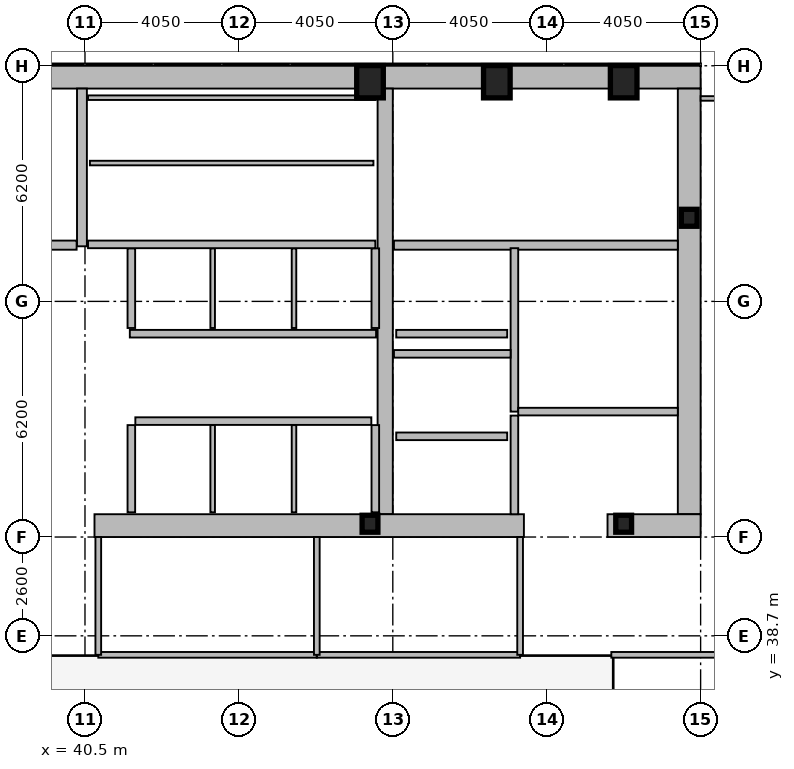
"""IFC4 building model, lengths in metres.
Left out: names, types, materials, properties, quantities, classifications, styles, units other than length and angle.
Written with IfcOpenShell. Run it as: python <this file> out.ifc"""

import sys

from ifc_helpers import new_model, si_unit, direction, frame, frame_2d, origin, origin_2d, place, context, subcontext, project, spatial, rectangle, hollow_rectangle, i_section, extrude, element, fill, save


model = new_model("IFC4")
c1 = context("Model", 3, precision=1e-05, world=origin(), true_north=direction((0.0, 1.0)))
c2 = subcontext(c1, "Body", "Model", "MODEL_VIEW")
j1 = project(units=[si_unit("LENGTHUNIT", "METRE"), si_unit("PLANEANGLEUNIT", "RADIAN")], contexts=[c1])
p1 = place(None, origin())
s1 = spatial("IfcSite", under=j1, at=p1, CompositionType="ELEMENT")
p2 = place(p1, origin())
s2 = spatial("IfcBuilding", under=s1, at=p2, CompositionType="ELEMENT")
p3 = place(p2, frame((0.0, 0.0, 184.2)))
s3 = spatial("IfcBuildingStorey", under=s2, at=p3, CompositionType="ELEMENT", Elevation=184.2)
p4 = place(p3, frame((16.2, 53.4, 0.0), z_axis=(0.0, 0.0, 1.0), x_axis=(1.0, 0.0, 0.0)))
e1 = element("IfcWall", 1, at=p4, inside=s3, PredefinedType="SHEAR", context=c2, shape_type="SweptSolid", body=[
    extrude(rectangle(XDim=40.5, YDim=0.6, at=frame_2d((20.25, 0.0))), origin(), (0.0, 0.0, 1.0), 4.24),
])
p5 = place(p3, frame((56.4, 53.1, 0.0), z_axis=(0.0, 0.0, 1.0), x_axis=(0.0, -1.0, 0.0)))
e2 = element("IfcWall", 2, at=p5, inside=s3, PredefinedType="SHEAR", context=c2, shape_type="SweptSolid", body=[
    extrude(rectangle(XDim=11.2, YDim=0.6, at=frame_2d((5.6, 0.0))), origin(), (0.0, 0.0, 1.0), 4.24),
])
p6 = place(p3, frame((48.4, 41.9, 0.0), z_axis=(0.0, 0.0, 1.0), x_axis=(0.0, 1.0, 0.0)))
e3 = element("IfcWall", 3, at=p6, inside=s3, PredefinedType="SHEAR", context=c2, shape_type="SweptSolid", body=[
    extrude(rectangle(XDim=11.2, YDim=0.4, at=frame_2d((5.6, 0.0))), origin(), (0.0, 0.0, 1.0), 4.24),
])
p7 = place(p3, frame((52.05, 41.6, 0.0), z_axis=(0.0, 0.0, 1.0), x_axis=(-1.0, 0.0, 0.0)))
e4 = element("IfcWall", 4, at=p7, inside=s3, PredefinedType="SHEAR", context=c2, shape_type="SweptSolid", body=[
    extrude(rectangle(XDim=11.3, YDim=0.6, at=frame_2d((5.65, 0.0))), origin(), (0.0, 0.0, 1.0), 4.24),
])
p8 = place(p3, frame((56.7, 41.6, 0.0), z_axis=(0.0, 0.0, 1.0), x_axis=(-1.0, 0.0, 0.0)))
e5 = element("IfcWall", 5, at=p8, inside=s3, PredefinedType="SHEAR", context=c2, shape_type="SweptSolid", body=[
    extrude(rectangle(XDim=2.45, YDim=0.6, at=frame_2d((1.225, 0.0))), origin(), (0.0, 0.0, 1.0), 4.24),
])
p9 = place(p3, frame((40.42, 48.95, 0.0), z_axis=(0.0, 0.0, 1.0), x_axis=(0.0, 1.0, 0.0)))
e6 = element("IfcWall", 6, at=p9, inside=s3, PredefinedType="SHEAR", context=c2, shape_type="SweptSolid", body=[
    extrude(rectangle(XDim=4.15, YDim=0.26, at=frame_2d((2.075, 0.0))), origin(), (0.0, 0.0, 1.0), 4.24),
])
p10 = place(p3, frame((48.63, 48.98, 0.0), z_axis=(0.0, 0.0, 1.0), x_axis=(1.0, 0.0, 0.0)))
e7 = element("IfcWall", 7, at=p10, inside=s3, PredefinedType="SHEAR", context=c2, shape_type="SweptSolid", body=[
    extrude(rectangle(XDim=7.47, YDim=0.24, at=frame_2d((3.735, 0.0))), origin(), (0.0, 0.0, 1.0), 4.24),
])
p11 = place(p10, frame((6.2, 0.0, 0.0)))
e8 = element("IfcOpeningElement", 8, at=p11, cuts=e7, PredefinedType="OPENING", context=c2, shape_type="SweptSolid", body=[
    extrude(rectangle(XDim=1.05, YDim=2.15, at=frame_2d((0.525, 1.075))), frame((0.0, 0.13, 0.0), z_axis=(0.0, -1.0, 0.0), x_axis=(1.0, 0.0, 0.0)), (0.0, 0.0, 1.0), 0.26),
])
p12 = place(p3, frame((32.72, 48.98, 0.0), z_axis=(0.0, 0.0, 1.0), x_axis=(1.0, 0.0, 0.0)))
e9 = element("IfcWall", 9, at=p12, inside=s3, PredefinedType="SHEAR", context=c2, shape_type="SweptSolid", body=[
    extrude(rectangle(XDim=7.56, YDim=0.24, at=frame_2d((3.78, 0.0))), origin(), (0.0, 0.0, 1.0), 4.24),
])
p13 = place(p12, frame((0.22, 0.0, 0.0)))
e10 = element("IfcOpeningElement", 10, at=p13, cuts=e9, PredefinedType="OPENING", context=c2, shape_type="SweptSolid", body=[
    extrude(rectangle(XDim=1.05, YDim=2.15, at=frame_2d((0.525, 1.075))), frame((0.0, 0.13, 0.0), z_axis=(0.0, -1.0, 0.0), x_axis=(1.0, 0.0, 0.0)), (0.0, 0.0, 1.0), 0.26),
])
for number, where, z_axis, x_axis in (
    (11, (48.0, 53.28, 0.0), (0.0, 0.0, 1.0), (1.0, 0.0, 0.0)),
    (12, (51.337, 53.28, 0.0), (0.0, 0.0, 1.0), (1.0, 0.0, 0.0)),
    (13, (54.675, 53.28, 0.0), (0.0, 0.0, 1.0), (1.0, 0.0, 0.0)),
):
    element("IfcColumn", number, at=place(p3, frame(where, z_axis=z_axis, x_axis=x_axis)), inside=s3, PredefinedType="COLUMN", context=c2, shape_type="SweptSolid", body=[
        extrude(hollow_rectangle(XDim=0.7, YDim=0.85, WallThickness=0.05, at=origin_2d()), origin(), (0.0, 0.0, 1.0), 4.4),
    ])
for number, where, z_axis, x_axis in (
    (14, (56.4, 49.7, 0.0), (0.0, 0.0, 1.0), (1.0, 0.0, 0.0)),
    (15, (48.0, 41.65, 0.0), (0.0, 0.0, 1.0), (1.0, 0.0, 0.0)),
    (16, (54.675, 41.65, 0.0), (0.0, 0.0, 1.0), (1.0, 0.0, 0.0)),
):
    element("IfcColumn", number, at=place(p3, frame(where, z_axis=z_axis, x_axis=x_axis)), inside=s3, PredefinedType="COLUMN", context=c2, shape_type="SweptSolid", body=[
        extrude(i_section(OverallWidth=0.416, OverallDepth=0.446, WebThickness=0.039, FlangeThickness=0.063, at=origin_2d()), origin(), (0.0, 0.0, 1.0), 4.4),
    ])
p14 = place(p3, frame((51.61, 43.95, 0.0), z_axis=(0.0, 0.0, 1.0), x_axis=(-1.0, 0.0, 0.0)))
e17 = element("IfcWall", 17, at=p14, inside=s3, PredefinedType="PARTITIONING", context=c2, shape_type="SweptSolid", body=[
    extrude(rectangle(XDim=2.92, YDim=0.2, at=frame_2d((1.46, 0.0))), origin(), (0.0, 0.0, 1.0), 4.24),
])
p15 = place(p14, frame((0.81, 0.0, 0.0)))
e18 = element("IfcOpeningElement", 18, at=p15, cuts=e17, PredefinedType="OPENING", context=c2, shape_type="SweptSolid", body=[
    extrude(rectangle(XDim=1.3, YDim=2.18, at=frame_2d((0.65, 1.09))), frame((0.0, 0.11, 0.0), z_axis=(0.0, -1.0, 0.0), x_axis=(1.0, 0.0, 0.0)), (0.0, 0.0, 1.0), 0.22),
])
p16 = place(p3, frame((51.61, 46.65, 0.0), z_axis=(0.0, 0.0, 1.0), x_axis=(-1.0, 0.0, 0.0)))
e19 = element("IfcWall", 19, at=p16, inside=s3, PredefinedType="PARTITIONING", context=c2, shape_type="SweptSolid", body=[
    extrude(rectangle(XDim=2.92, YDim=0.2, at=frame_2d((1.46, 0.0))), origin(), (0.0, 0.0, 1.0), 4.24),
])
p17 = place(p16, frame((0.86, 0.0, 0.0)))
e20 = element("IfcOpeningElement", 20, at=p17, cuts=e19, PredefinedType="OPENING", context=c2, shape_type="SweptSolid", body=[
    extrude(rectangle(XDim=1.2, YDim=2.18, at=frame_2d((0.6, 1.09))), frame((0.0, 0.11, 0.0), z_axis=(0.0, -1.0, 0.0), x_axis=(1.0, 0.0, 0.0)), (0.0, 0.0, 1.0), 0.22),
])
p18 = place(p3, frame((48.16, 46.65, 0.0), z_axis=(0.0, 0.0, 1.0), x_axis=(-1.0, 0.0, 0.0)))
e21 = element("IfcWall", 21, at=p18, inside=s3, PredefinedType="PARTITIONING", context=c2, shape_type="SweptSolid", body=[
    extrude(rectangle(XDim=6.48, YDim=0.2, at=frame_2d((3.24, 0.0))), origin(), (0.0, 0.0, 1.0), 4.24),
])
p19 = place(p18, frame((4.8, 0.0, 0.0)))
e22 = element("IfcOpeningElement", 22, at=p19, cuts=e21, PredefinedType="OPENING", context=c2, shape_type="SweptSolid", body=[
    extrude(rectangle(XDim=1.1, YDim=2.18, at=frame_2d((0.55, 1.09))), frame((0.0, 0.11, 0.0), z_axis=(0.0, -1.0, 0.0), x_axis=(1.0, 0.0, 0.0)), (0.0, 0.0, 1.0), 0.22),
])
p20 = place(p18, frame((2.64, 0.0, 0.0)))
e23 = element("IfcOpeningElement", 23, at=p20, cuts=e21, PredefinedType="OPENING", context=c2, shape_type="SweptSolid", body=[
    extrude(rectangle(XDim=1.1, YDim=2.18, at=frame_2d((0.55, 1.09))), frame((0.0, 0.11, 0.0), z_axis=(0.0, -1.0, 0.0), x_axis=(1.0, 0.0, 0.0)), (0.0, 0.0, 1.0), 0.22),
])
p21 = place(p18, frame((0.48, 0.0, 0.0)))
e24 = element("IfcOpeningElement", 24, at=p21, cuts=e21, PredefinedType="OPENING", context=c2, shape_type="SweptSolid", body=[
    extrude(rectangle(XDim=1.1, YDim=2.18, at=frame_2d((0.55, 1.09))), frame((0.0, 0.11, 0.0), z_axis=(0.0, -1.0, 0.0), x_axis=(1.0, 0.0, 0.0)), (0.0, 0.0, 1.0), 0.22),
])
p22 = place(p3, frame((51.8, 44.6, 0.0), z_axis=(0.0, 0.0, 1.0), x_axis=(0.0, 1.0, 0.0)))
e25 = element("IfcWall", 25, at=p22, inside=s3, PredefinedType="PARTITIONING", context=c2, shape_type="SweptSolid", body=[
    extrude(rectangle(XDim=4.3, YDim=0.2, at=frame_2d((2.15, 0.0))), origin(), (0.0, 0.0, 1.0), 4.24),
])
p23 = place(p3, frame((51.9, 44.6, 0.0), z_axis=(0.0, 0.0, 1.0), x_axis=(1.0, 0.0, 0.0)))
e26 = element("IfcWall", 26, at=p23, inside=s3, PredefinedType="PARTITIONING", context=c2, shape_type="SweptSolid", body=[
    extrude(rectangle(XDim=4.2, YDim=0.2, at=frame_2d((2.1, 0.0))), origin(), (0.0, 0.0, 1.0), 4.24),
])
p24 = place(p23, frame((1.15, 0.0, 0.0)))
e27 = element("IfcOpeningElement", 27, at=p24, cuts=e26, PredefinedType="OPENING", context=c2, shape_type="SweptSolid", body=[
    extrude(rectangle(XDim=1.05, YDim=2.15, at=frame_2d((0.525, 1.075))), frame((0.0, 0.11, 0.0), z_axis=(0.0, -1.0, 0.0), x_axis=(1.0, 0.0, 0.0)), (0.0, 0.0, 1.0), 0.22),
])
p25 = place(p3, frame((48.63, 46.12, 0.0), z_axis=(0.0, 0.0, 1.0), x_axis=(1.0, 0.0, 0.0)))
e28 = element("IfcWall", 28, at=p25, inside=s3, PredefinedType="PARTITIONING", context=c2, shape_type="SweptSolid", body=[
    extrude(rectangle(XDim=3.07, YDim=0.2, at=frame_2d((1.535, 0.0))), origin(), (0.0, 0.0, 1.0), 4.24),
])
p26 = place(p3, frame((51.8, 41.9, 0.0), z_axis=(0.0, 0.0, 1.0), x_axis=(0.0, 1.0, 0.0)))
e29 = element("IfcWall", 29, at=p26, inside=s3, PredefinedType="PARTITIONING", context=c2, shape_type="SweptSolid", body=[
    extrude(rectangle(XDim=2.595, YDim=0.2, at=frame_2d((1.298, 0.0))), origin(), (0.0, 0.0, 1.0), 4.24),
])
p27 = place(p26, frame((0.38, 0.0, 0.0)))
e30 = element("IfcOpeningElement", 30, at=p27, cuts=e29, PredefinedType="OPENING", context=c2, shape_type="SweptSolid", body=[
    extrude(rectangle(XDim=1.05, YDim=2.15, at=frame_2d((0.525, 1.075))), frame((0.0, 0.11, 0.0), z_axis=(0.0, -1.0, 0.0), x_axis=(1.0, 0.0, 0.0)), (0.0, 0.0, 1.0), 0.22),
])
for number, where, z_axis, x_axis in (
    (31, (41.72, 46.8, 0.0), (0.0, 0.0, 1.0), (0.0, 1.0, 0.0)),
    (32, (48.14, 46.8, 0.0), (0.0, 0.0, 1.0), (0.0, 1.0, 0.0)),
):
    element("IfcWall", number, at=place(p3, frame(where, z_axis=z_axis, x_axis=x_axis)), inside=s3, PredefinedType="PARTITIONING", context=c2, shape_type="SweptSolid", body=[
        extrude(rectangle(XDim=2.095, YDim=0.2, at=frame_2d((1.047, 0.0))), origin(), (0.0, 0.0, 1.0), 4.24),
    ])
for number, where, z_axis, x_axis in (
    (33, (43.86, 46.8, 0.0), (0.0, 0.0, 1.0), (0.0, 1.0, 0.0)),
    (34, (46.0, 46.8, 0.0), (0.0, 0.0, 1.0), (0.0, 1.0, 0.0)),
):
    element("IfcWall", number, at=place(p3, frame(where, z_axis=z_axis, x_axis=x_axis)), inside=s3, PredefinedType="PARTITIONING", context=c2, shape_type="SweptSolid", body=[
        extrude(rectangle(XDim=2.095, YDim=0.12, at=frame_2d((1.047, 0.0))), origin(), (0.0, 0.0, 1.0), 4.24),
    ])
p28 = place(p3, frame((41.825, 44.35, 0.0), z_axis=(0.0, 0.0, 1.0), x_axis=(1.0, 0.0, 0.0)))
e35 = element("IfcWall", 35, at=p28, inside=s3, PredefinedType="PARTITIONING", context=c2, shape_type="SweptSolid", body=[
    extrude(rectangle(XDim=6.21, YDim=0.2, at=frame_2d((3.105, 0.0))), origin(), (0.0, 0.0, 1.0), 4.24),
])
for number, where, z_axis, x_axis in (
    (36, (41.72, 41.95, 0.0), (0.0, 0.0, 1.0), (0.0, 1.0, 0.0)),
    (37, (48.14, 41.95, 0.0), (0.0, 0.0, 1.0), (0.0, 1.0, 0.0)),
):
    element("IfcWall", number, at=place(p3, frame(where, z_axis=z_axis, x_axis=x_axis)), inside=s3, PredefinedType="PARTITIONING", context=c2, shape_type="SweptSolid", body=[
        extrude(rectangle(XDim=2.295, YDim=0.2, at=frame_2d((1.147, 0.0))), origin(), (0.0, 0.0, 1.0), 4.24),
    ])
for number, where, z_axis, x_axis in (
    (38, (43.86, 41.95, 0.0), (0.0, 0.0, 1.0), (0.0, 1.0, 0.0)),
    (39, (46.0, 41.95, 0.0), (0.0, 0.0, 1.0), (0.0, 1.0, 0.0)),
):
    element("IfcWall", number, at=place(p3, frame(where, z_axis=z_axis, x_axis=x_axis)), inside=s3, PredefinedType="PARTITIONING", context=c2, shape_type="SweptSolid", body=[
        extrude(rectangle(XDim=2.295, YDim=0.12, at=frame_2d((1.147, 0.0))), origin(), (0.0, 0.0, 1.0), 4.24),
    ])
p29 = place(p3, frame((40.58, 52.86, 0.0), z_axis=(0.0, 0.0, 1.0), x_axis=(1.0, 0.0, 0.0)))
e40 = element("IfcWall", 40, at=p29, inside=s3, PredefinedType="PARTITIONING", context=c2, shape_type="SweptSolid", body=[
    extrude(rectangle(XDim=7.56, YDim=0.12, at=frame_2d((3.78, 0.0))), origin(), (0.0, 0.0, 1.0), 4.24),
])
p30 = place(p3, frame((40.58, 49.0, 0.0), z_axis=(0.0, 0.0, 1.0), x_axis=(1.0, 0.0, 0.0)))
e41 = element("IfcWall", 41, at=p30, inside=s3, PredefinedType="PARTITIONING", context=c2, shape_type="SweptSolid", body=[
    extrude(rectangle(XDim=7.56, YDim=0.2, at=frame_2d((3.78, 0.0))), origin(), (0.0, 0.0, 1.0), 4.24),
])
p31 = place(p30, frame((0.16, 0.0, 0.0)))
e42 = element("IfcOpeningElement", 42, at=p31, cuts=e41, PredefinedType="OPENING", context=c2, shape_type="SweptSolid", body=[
    extrude(rectangle(XDim=0.95, YDim=2.1, at=frame_2d((0.475, 1.05))), frame((0.0, 0.11, 0.0), z_axis=(0.0, -1.0, 0.0), x_axis=(1.0, 0.0, 0.0)), (0.0, 0.0, 1.0), 0.22),
])
p32 = place(p3, frame((40.63, 51.14, 0.0), z_axis=(0.0, 0.0, 1.0), x_axis=(1.0, 0.0, 0.0)))
e43 = element("IfcWall", 43, at=p32, inside=s3, PredefinedType="PARTITIONING", context=c2, shape_type="SweptSolid", body=[
    extrude(rectangle(XDim=7.46, YDim=0.12, at=frame_2d((3.73, 0.0))), origin(), (0.0, 0.0, 1.0), 4.24),
])
p33 = place(p32, frame((2.4, 0.0, 0.0)))
e44 = element("IfcOpeningElement", 44, at=p33, cuts=e43, PredefinedType="OPENING", context=c2, shape_type="SweptSolid", body=[
    extrude(rectangle(XDim=0.9, YDim=2.05, at=frame_2d((0.45, 1.025))), frame((0.0, 0.07, 0.0), z_axis=(0.0, -1.0, 0.0), x_axis=(1.0, 0.0, 0.0)), (0.0, 0.0, 1.0), 0.14),
])
p34 = place(p3, frame((40.85, 38.2, 0.0), z_axis=(0.0, 0.0, 1.0), x_axis=(1.0, 0.0, 0.0)))
e45 = element("IfcWall", 45, at=p34, inside=s3, PredefinedType="PARTITIONING", context=c2, shape_type="SweptSolid", body=[
    extrude(rectangle(XDim=5.75, YDim=0.15, at=frame_2d((2.875, 0.0))), origin(), (0.0, 0.0, 1.0), 3.53),
])
p35 = place(p34, frame((2.1, 0.0, 0.0)))
e46 = element("IfcOpeningElement", 46, at=p35, cuts=e45, PredefinedType="OPENING", context=c2, shape_type="SweptSolid", body=[
    extrude(rectangle(XDim=1.0, YDim=2.05, at=frame_2d((0.5, 1.025))), frame((0.0, 0.085, 0.0), z_axis=(0.0, -1.0, 0.0), x_axis=(1.0, 0.0, 0.0)), (0.0, 0.0, 1.0), 0.17),
])
p36 = place(p3, frame((46.6, 38.2, 0.0), z_axis=(0.0, 0.0, 1.0), x_axis=(1.0, 0.0, 0.0)))
e47 = element("IfcWall", 47, at=p36, inside=s3, PredefinedType="PARTITIONING", context=c2, shape_type="SweptSolid", body=[
    extrude(rectangle(XDim=5.35, YDim=0.15, at=frame_2d((2.675, 0.0))), origin(), (0.0, 0.0, 1.0), 3.53),
])
p37 = place(p36, frame((2.0, 0.0, 0.0)))
e48 = element("IfcOpeningElement", 48, at=p37, cuts=e47, PredefinedType="OPENING", context=c2, shape_type="SweptSolid", body=[
    extrude(rectangle(XDim=0.9, YDim=2.05, at=frame_2d((0.45, 1.025))), frame((0.0, 0.085, 0.0), z_axis=(0.0, -1.0, 0.0), x_axis=(1.0, 0.0, 0.0)), (0.0, 0.0, 1.0), 0.17),
])
for number, where, z_axis, x_axis in (
    (49, (40.85, 38.2, 0.0), (0.0, 0.0, 1.0), (0.0, 1.0, 0.0)),
    (50, (46.6, 38.2, 0.0), (0.0, 0.0, 1.0), (0.0, 1.0, 0.0)),
    (51, (51.95, 38.2, 0.0), (0.0, 0.0, 1.0), (0.0, 1.0, 0.0)),
):
    element("IfcWall", number, at=place(p3, frame(where, z_axis=z_axis, x_axis=x_axis)), inside=s3, PredefinedType="PARTITIONING", context=c2, shape_type="SweptSolid", body=[
        extrude(rectangle(XDim=3.1, YDim=0.15, at=frame_2d((1.55, 0.0))), origin(), (0.0, 0.0, 1.0), 4.24),
    ])
p38 = place(p3, frame((54.35, 38.2, 0.0), z_axis=(0.0, 0.0, 1.0), x_axis=(1.0, 0.0, 0.0)))
e52 = element("IfcWall", 52, at=p38, inside=s3, PredefinedType="PARTITIONING", context=c2, shape_type="SweptSolid", body=[
    extrude(rectangle(XDim=12.52, YDim=0.15, at=frame_2d((6.26, 0.0))), origin(), (0.0, 0.0, 1.0), 3.53),
])
p39 = place(p38, frame((1.8, 0.0, 0.0)))
e53 = element("IfcOpeningElement", 53, at=p39, cuts=e52, PredefinedType="OPENING", context=c2, shape_type="SweptSolid", body=[
    extrude(rectangle(XDim=1.0, YDim=2.05, at=frame_2d((0.5, 1.025))), frame((0.0, 0.085, 0.0), z_axis=(0.0, -1.0, 0.0), x_axis=(1.0, 0.0, 0.0)), (0.0, 0.0, 1.0), 0.17),
])
p40 = place(p3, frame((56.7, 52.84, 0.0), z_axis=(0.0, 0.0, 1.0), x_axis=(1.0, 0.0, 0.0)))
e54 = element("IfcWall", 54, at=p40, inside=s3, PredefinedType="PARTITIONING", context=c2, shape_type="SweptSolid", body=[
    extrude(rectangle(XDim=10.105, YDim=0.12, at=frame_2d((5.052, 0.0))), origin(), (0.0, 0.0, 1.0), 4.24),
])
p41 = place(p11, origin())
e55 = element("IfcDoor", 55, at=p41, inside=s3, OperationType="SINGLE_SWING_RIGHT", PredefinedType="DOOR", context=c2, shape_type="SweptSolid", body=[
    extrude(rectangle(XDim=1.05, YDim=2.15, at=frame_2d((0.525, 1.075))), frame((0.0, 0.025, 0.0), z_axis=(0.0, -1.0, 0.0), x_axis=(1.0, 0.0, 0.0)), (0.0, 0.0, 1.0), 0.05),
])
fill(e8, e55)
p42 = place(p15, origin())
e56 = element("IfcDoor", 56, at=p42, inside=s3, OperationType="SLIDING_TO_LEFT", PredefinedType="DOOR", context=c2, shape_type="SweptSolid", body=[
    extrude(rectangle(XDim=1.3, YDim=2.18, at=frame_2d((0.65, 1.09))), frame((0.0, 0.025, 0.0), z_axis=(0.0, -1.0, 0.0), x_axis=(1.0, 0.0, 0.0)), (0.0, 0.0, 1.0), 0.05),
])
fill(e18, e56)
p43 = place(p17, origin())
e57 = element("IfcDoor", 57, at=p43, inside=s3, OperationType="SLIDING_TO_LEFT", PredefinedType="DOOR", context=c2, shape_type="SweptSolid", body=[
    extrude(rectangle(XDim=1.2, YDim=2.18, at=frame_2d((0.6, 1.09))), frame((0.0, 0.025, 0.0), z_axis=(0.0, -1.0, 0.0), x_axis=(1.0, 0.0, 0.0)), (0.0, 0.0, 1.0), 0.05),
])
fill(e20, e57)
p44 = place(p19, origin())
e58 = element("IfcDoor", 58, at=p44, inside=s3, OperationType="SLIDING_TO_LEFT", PredefinedType="DOOR", context=c2, shape_type="SweptSolid", body=[
    extrude(rectangle(XDim=1.1, YDim=2.18, at=frame_2d((0.55, 1.09))), frame((0.0, 0.025, 0.0), z_axis=(0.0, -1.0, 0.0), x_axis=(1.0, 0.0, 0.0)), (0.0, 0.0, 1.0), 0.05),
])
fill(e22, e58)
p45 = place(p20, origin())
e59 = element("IfcDoor", 59, at=p45, inside=s3, OperationType="SLIDING_TO_LEFT", PredefinedType="DOOR", context=c2, shape_type="SweptSolid", body=[
    extrude(rectangle(XDim=1.1, YDim=2.18, at=frame_2d((0.55, 1.09))), frame((0.0, 0.025, 0.0), z_axis=(0.0, -1.0, 0.0), x_axis=(1.0, 0.0, 0.0)), (0.0, 0.0, 1.0), 0.05),
])
fill(e23, e59)
p46 = place(p21, origin())
e60 = element("IfcDoor", 60, at=p46, inside=s3, OperationType="SLIDING_TO_LEFT", PredefinedType="DOOR", context=c2, shape_type="SweptSolid", body=[
    extrude(rectangle(XDim=1.1, YDim=2.18, at=frame_2d((0.55, 1.09))), frame((0.0, 0.025, 0.0), z_axis=(0.0, -1.0, 0.0), x_axis=(1.0, 0.0, 0.0)), (0.0, 0.0, 1.0), 0.05),
])
fill(e24, e60)
p47 = place(p24, origin())
e61 = element("IfcDoor", 61, at=p47, inside=s3, OperationType="SINGLE_SWING_RIGHT", PredefinedType="DOOR", context=c2, shape_type="SweptSolid", body=[
    extrude(rectangle(XDim=1.05, YDim=2.15, at=frame_2d((0.525, 1.075))), frame((0.0, 0.025, 0.0), z_axis=(0.0, -1.0, 0.0), x_axis=(1.0, 0.0, 0.0)), (0.0, 0.0, 1.0), 0.05),
])
fill(e27, e61)
p48 = place(p27, origin())
e62 = element("IfcDoor", 62, at=p48, inside=s3, OperationType="SINGLE_SWING_LEFT", PredefinedType="DOOR", context=c2, shape_type="SweptSolid", body=[
    extrude(rectangle(XDim=1.05, YDim=2.15, at=frame_2d((0.525, 1.075))), frame((0.0, 0.025, 0.0), z_axis=(0.0, -1.0, 0.0), x_axis=(1.0, 0.0, 0.0)), (0.0, 0.0, 1.0), 0.05),
])
fill(e30, e62)
p49 = place(p31, origin())
e63 = element("IfcDoor", 63, at=p49, inside=s3, OperationType="SINGLE_SWING_RIGHT", PredefinedType="DOOR", context=c2, shape_type="SweptSolid", body=[
    extrude(rectangle(XDim=0.95, YDim=2.1, at=frame_2d((0.475, 1.05))), frame((0.0, 0.025, 0.0), z_axis=(0.0, -1.0, 0.0), x_axis=(1.0, 0.0, 0.0)), (0.0, 0.0, 1.0), 0.05),
])
fill(e42, e63)
p50 = place(p33, origin())
e64 = element("IfcDoor", 64, at=p50, inside=s3, OperationType="SINGLE_SWING_LEFT", PredefinedType="DOOR", context=c2, shape_type="SweptSolid", body=[
    extrude(rectangle(XDim=0.9, YDim=2.05, at=frame_2d((0.45, 1.025))), frame((0.0, 0.025, 0.0), z_axis=(0.0, -1.0, 0.0), x_axis=(1.0, 0.0, 0.0)), (0.0, 0.0, 1.0), 0.05),
])
fill(e44, e64)
p51 = place(p35, origin())
e65 = element("IfcDoor", 65, at=p51, inside=s3, OperationType="SINGLE_SWING_LEFT", PredefinedType="DOOR", context=c2, shape_type="SweptSolid", body=[
    extrude(rectangle(XDim=1.0, YDim=2.05, at=frame_2d((0.5, 1.025))), frame((0.0, 0.025, 0.0), z_axis=(0.0, -1.0, 0.0), x_axis=(1.0, 0.0, 0.0)), (0.0, 0.0, 1.0), 0.05),
])
fill(e46, e65)
p52 = place(p37, origin())
e66 = element("IfcDoor", 66, at=p52, inside=s3, OperationType="SINGLE_SWING_RIGHT", PredefinedType="DOOR", context=c2, shape_type="SweptSolid", body=[
    extrude(rectangle(XDim=0.9, YDim=2.05, at=frame_2d((0.45, 1.025))), frame((0.0, 0.025, 0.0), z_axis=(0.0, -1.0, 0.0), x_axis=(1.0, 0.0, 0.0)), (0.0, 0.0, 1.0), 0.05),
])
fill(e48, e66)
p53 = place(p39, origin())
e67 = element("IfcDoor", 67, at=p53, inside=s3, OperationType="SINGLE_SWING_RIGHT", PredefinedType="DOOR", context=c2, shape_type="SweptSolid", body=[
    extrude(rectangle(XDim=1.0, YDim=2.05, at=frame_2d((0.5, 1.025))), frame((0.0, 0.025, 0.0), z_axis=(0.0, -1.0, 0.0), x_axis=(1.0, 0.0, 0.0)), (0.0, 0.0, 1.0), 0.05),
])
fill(e53, e67)
save(model, sys.argv[1])
